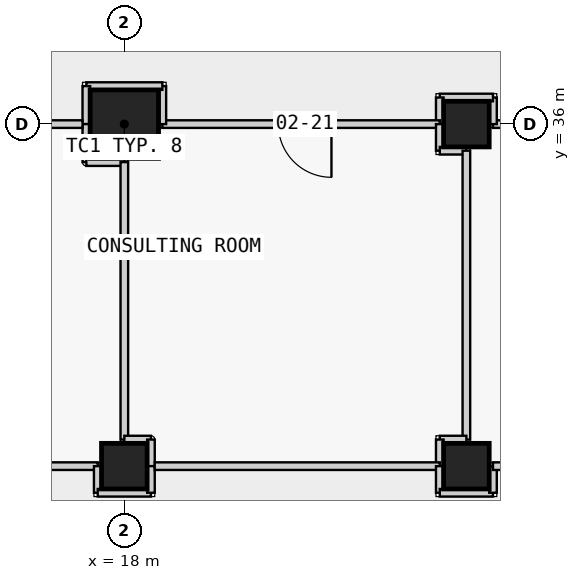
"""IFC4 building model, lengths in metres.
Left out: names, types, materials, properties, quantities, classifications, styles, units other than length and angle.
Written with IfcOpenShell. Run it as: python <this file> out.ifc"""

import sys

from ifc_helpers import new_model, si_unit, direction, frame, frame_2d, origin, origin_2d, place, context, subcontext, project, spatial, rectangle, extrude, element, fill, save


model = new_model("IFC4")
c1 = context("Model", 3, precision=1e-05, world=origin(), true_north=direction((0.0, 1.0)))
c2 = subcontext(c1, "Body", "Model", "MODEL_VIEW")
j1 = project(units=[si_unit("LENGTHUNIT", "METRE"), si_unit("PLANEANGLEUNIT", "RADIAN")], contexts=[c1])
p1 = place(None, origin())
s1 = spatial("IfcSite", under=j1, at=p1, CompositionType="ELEMENT")
p2 = place(p1, origin())
s2 = spatial("IfcBuilding", under=s1, at=p2, CompositionType="ELEMENT")
p3 = place(p2, frame((0.0, 0.0, 12.8)))
s3 = spatial("IfcBuildingStorey", under=s2, at=p3, CompositionType="ELEMENT", Elevation=12.8)
p4 = place(p3, frame((18.0, 27.0, 0.0), z_axis=(0.0, 0.0, 1.0), x_axis=(1.0, 0.0, 0.0)))
e1 = element("IfcColumn", 1, at=p4, inside=s3, PredefinedType="COLUMN", context=c2, shape_type="SweptSolid", body=[
    extrude(rectangle(XDim=1.2, YDim=1.2, at=origin_2d()), origin(), (0.0, 0.0, 1.0), 4.5),
])
p5 = place(p3, frame((18.0, 36.0, 0.0), z_axis=(0.0, 0.0, 1.0), x_axis=(1.0, 0.0, 0.0)))
e2 = element("IfcColumn", 2, at=p5, inside=s3, PredefinedType="COLUMN", context=c2, shape_type="SweptSolid", body=[
    extrude(rectangle(XDim=1.8, YDim=1.8, at=origin_2d()), origin(), (0.0, 0.0, 1.0), 4.5),
])
for number, where, z_axis, x_axis in (
    (3, (27.0, 27.0, 0.0), (0.0, 0.0, 1.0), (1.0, 0.0, 0.0)),
    (4, (27.0, 36.0, 0.0), (0.0, 0.0, 1.0), (1.0, 0.0, 0.0)),
):
    element("IfcColumn", number, at=place(p3, frame(where, z_axis=z_axis, x_axis=x_axis)), inside=s3, PredefinedType="COLUMN", context=c2, shape_type="SweptSolid", body=[
        extrude(rectangle(XDim=1.2, YDim=1.2, at=origin_2d()), origin(), (0.0, 0.0, 1.0), 4.5),
    ])
p6 = place(p3, frame((35.3, 36.0, 0.0), z_axis=(0.0, 0.0, 1.0), x_axis=(-1.0, 0.0, 0.0)))
e5 = element("IfcWall", 5, at=p6, inside=s3, PredefinedType="PARTITIONING", context=c2, shape_type="SweptSolid", body=[
    extrude(rectangle(XDim=7.6, YDim=0.2, at=frame_2d((3.8, 0.0))), origin(), (0.0, 0.0, 1.0), 3.45),
])
p7 = place(p6, frame((3.1, 0.0, 0.0)))
e6 = element("IfcOpeningElement", 6, at=p7, cuts=e5, PredefinedType="OPENING", context=c2, shape_type="SweptSolid", body=[
    extrude(rectangle(XDim=1.4, YDim=2.1, at=frame_2d((0.7, 1.05))), frame((0.0, 0.11, 0.0), z_axis=(0.0, -1.0, 0.0), x_axis=(1.0, 0.0, 0.0)), (0.0, 0.0, 1.0), 0.22),
])
p8 = place(p3, frame((27.7, 36.0, 0.0), z_axis=(0.0, 0.0, 1.0), x_axis=(0.0, 1.0, 0.0)))
e7 = element("IfcWall", 7, at=p8, inside=s3, PredefinedType="PARTITIONING", context=c2, shape_type="SweptSolid", body=[
    extrude(rectangle(XDim=0.7, YDim=0.2, at=frame_2d((0.35, 0.0))), origin(), (0.0, 0.0, 1.0), 3.45),
])
p9 = place(p3, frame((27.7, 36.7, 0.0), z_axis=(0.0, 0.0, 1.0), x_axis=(-1.0, 0.0, 0.0)))
e8 = element("IfcWall", 8, at=p9, inside=s3, PredefinedType="PARTITIONING", context=c2, shape_type="SweptSolid", body=[
    extrude(rectangle(XDim=1.4, YDim=0.2, at=frame_2d((0.7, 0.0))), origin(), (0.0, 0.0, 1.0), 3.45),
])
p10 = place(p3, frame((26.3, 36.7, 0.0), z_axis=(0.0, 0.0, 1.0), x_axis=(0.0, -1.0, 0.0)))
e9 = element("IfcWall", 9, at=p10, inside=s3, PredefinedType="PARTITIONING", context=c2, shape_type="SweptSolid", body=[
    extrude(rectangle(XDim=0.7, YDim=0.2, at=frame_2d((0.35, 0.0))), origin(), (0.0, 0.0, 1.0), 3.45),
])
p11 = place(p3, frame((26.3, 36.0, 0.0), z_axis=(0.0, 0.0, 1.0), x_axis=(-1.0, 0.0, 0.0)))
e10 = element("IfcWall", 10, at=p11, inside=s3, PredefinedType="PARTITIONING", context=c2, shape_type="SweptSolid", body=[
    extrude(rectangle(XDim=7.3, YDim=0.2, at=frame_2d((3.65, 0.0))), origin(), (0.0, 0.0, 1.0), 3.45),
])
p12 = place(p11, frame((2.85, 0.0, 0.0)))
e11 = element("IfcOpeningElement", 11, at=p12, cuts=e10, PredefinedType="OPENING", context=c2, shape_type="SweptSolid", body=[
    extrude(rectangle(XDim=1.4, YDim=2.1, at=frame_2d((0.7, 1.05))), frame((0.0, 0.11, 0.0), z_axis=(0.0, -1.0, 0.0), x_axis=(1.0, 0.0, 0.0)), (0.0, 0.0, 1.0), 0.22),
])
p13 = place(p3, frame((19.0, 36.0, 0.0), z_axis=(0.0, 0.0, 1.0), x_axis=(0.0, 1.0, 0.0)))
e12 = element("IfcWall", 12, at=p13, inside=s3, PredefinedType="PARTITIONING", context=c2, shape_type="SweptSolid", body=[
    extrude(rectangle(XDim=1.0, YDim=0.2, at=frame_2d((0.5, 0.0))), origin(), (0.0, 0.0, 1.0), 3.45),
])
p14 = place(p3, frame((19.0, 37.0, 0.0), z_axis=(0.0, 0.0, 1.0), x_axis=(-1.0, 0.0, 0.0)))
e13 = element("IfcWall", 13, at=p14, inside=s3, PredefinedType="PARTITIONING", context=c2, shape_type="SweptSolid", body=[
    extrude(rectangle(XDim=2.0, YDim=0.2, at=frame_2d((1.0, 0.0))), origin(), (0.0, 0.0, 1.0), 3.45),
])
for number, where, z_axis, x_axis in (
    (14, (17.0, 37.0, 0.0), (0.0, 0.0, 1.0), (0.0, -1.0, 0.0)),
    (15, (17.0, 36.0, 0.0), (0.0, 0.0, 1.0), (0.0, -1.0, 0.0)),
    (16, (17.0, 35.0, 0.0), (0.0, 0.0, 1.0), (1.0, 0.0, 0.0)),
):
    element("IfcWall", number, at=place(p3, frame(where, z_axis=z_axis, x_axis=x_axis)), inside=s3, PredefinedType="PARTITIONING", context=c2, shape_type="SweptSolid", body=[
        extrude(rectangle(XDim=1.0, YDim=0.2, at=frame_2d((0.5, 0.0))), origin(), (0.0, 0.0, 1.0), 3.45),
    ])
p15 = place(p3, frame((18.0, 35.0, 0.0), z_axis=(0.0, 0.0, 1.0), x_axis=(0.0, -1.0, 0.0)))
e17 = element("IfcWall", 17, at=p15, inside=s3, PredefinedType="PARTITIONING", context=c2, shape_type="SweptSolid", body=[
    extrude(rectangle(XDim=7.3, YDim=0.2, at=frame_2d((3.65, 0.0))), origin(), (0.0, 0.0, 1.0), 3.45),
])
for number, where, z_axis, x_axis in (
    (18, (18.0, 27.7, 0.0), (0.0, 0.0, 1.0), (1.0, 0.0, 0.0)),
    (19, (18.7, 27.7, 0.0), (0.0, 0.0, 1.0), (0.0, -1.0, 0.0)),
    (20, (26.3, 36.0, 0.0), (0.0, 0.0, 1.0), (0.0, -1.0, 0.0)),
    (21, (26.3, 35.3, 0.0), (0.0, 0.0, 1.0), (1.0, 0.0, 0.0)),
):
    element("IfcWall", number, at=place(p3, frame(where, z_axis=z_axis, x_axis=x_axis)), inside=s3, PredefinedType="PARTITIONING", context=c2, shape_type="SweptSolid", body=[
        extrude(rectangle(XDim=0.7, YDim=0.2, at=frame_2d((0.35, 0.0))), origin(), (0.0, 0.0, 1.0), 3.45),
    ])
p16 = place(p3, frame((27.0, 35.3, 0.0), z_axis=(0.0, 0.0, 1.0), x_axis=(0.0, -1.0, 0.0)))
e22 = element("IfcWall", 22, at=p16, inside=s3, PredefinedType="PARTITIONING", context=c2, shape_type="SweptSolid", body=[
    extrude(rectangle(XDim=7.6, YDim=0.2, at=frame_2d((3.8, 0.0))), origin(), (0.0, 0.0, 1.0), 3.45),
])
for number, where, z_axis, x_axis in (
    (23, (27.0, 27.7, 0.0), (0.0, 0.0, 1.0), (-1.0, 0.0, 0.0)),
    (24, (26.3, 27.7, 0.0), (0.0, 0.0, 1.0), (0.0, -1.0, 0.0)),
):
    element("IfcWall", number, at=place(p3, frame(where, z_axis=z_axis, x_axis=x_axis)), inside=s3, PredefinedType="PARTITIONING", context=c2, shape_type="SweptSolid", body=[
        extrude(rectangle(XDim=0.7, YDim=0.2, at=frame_2d((0.35, 0.0))), origin(), (0.0, 0.0, 1.0), 3.45),
    ])
p17 = place(p3, frame((9.7, 27.0, 0.0), z_axis=(0.0, 0.0, 1.0), x_axis=(1.0, 0.0, 0.0)))
e25 = element("IfcWall", 25, at=p17, inside=s3, PredefinedType="PARTITIONING", context=c2, shape_type="SweptSolid", body=[
    extrude(rectangle(XDim=7.6, YDim=0.2, at=frame_2d((3.8, 0.0))), origin(), (0.0, 0.0, 1.0), 3.45),
])
p18 = place(p17, frame((3.1, 0.0, 0.0)))
e26 = element("IfcOpeningElement", 26, at=p18, cuts=e25, PredefinedType="OPENING", context=c2, shape_type="SweptSolid", body=[
    extrude(rectangle(XDim=1.4, YDim=2.1, at=frame_2d((0.7, 1.05))), frame((0.0, 0.11, 0.0), z_axis=(0.0, -1.0, 0.0), x_axis=(1.0, 0.0, 0.0)), (0.0, 0.0, 1.0), 0.22),
])
p19 = place(p3, frame((17.3, 27.0, 0.0), z_axis=(0.0, 0.0, 1.0), x_axis=(0.0, -1.0, 0.0)))
e27 = element("IfcWall", 27, at=p19, inside=s3, PredefinedType="PARTITIONING", context=c2, shape_type="SweptSolid", body=[
    extrude(rectangle(XDim=0.7, YDim=0.2, at=frame_2d((0.35, 0.0))), origin(), (0.0, 0.0, 1.0), 3.45),
])
p20 = place(p3, frame((17.3, 26.3, 0.0), z_axis=(0.0, 0.0, 1.0), x_axis=(1.0, 0.0, 0.0)))
e28 = element("IfcWall", 28, at=p20, inside=s3, PredefinedType="PARTITIONING", context=c2, shape_type="SweptSolid", body=[
    extrude(rectangle(XDim=1.4, YDim=0.2, at=frame_2d((0.7, 0.0))), origin(), (0.0, 0.0, 1.0), 4.15),
])
p21 = place(p3, frame((18.7, 26.3, 0.0), z_axis=(0.0, 0.0, 1.0), x_axis=(0.0, 1.0, 0.0)))
e29 = element("IfcWall", 29, at=p21, inside=s3, PredefinedType="PARTITIONING", context=c2, shape_type="SweptSolid", body=[
    extrude(rectangle(XDim=0.7, YDim=0.2, at=frame_2d((0.35, 0.0))), origin(), (0.0, 0.0, 1.0), 3.45),
])
p22 = place(p3, frame((16.9, 36.0, 0.0), z_axis=(0.0, 0.0, 1.0), x_axis=(-1.0, 0.0, 0.0)))
e30 = element("IfcWall", 30, at=p22, inside=s3, PredefinedType="PARTITIONING", context=c2, shape_type="SweptSolid", body=[
    extrude(rectangle(XDim=7.2, YDim=0.2, at=frame_2d((3.6, 0.0))), origin(), (0.0, 0.0, 1.0), 3.45),
])
p23 = place(p3, frame((18.8, 27.0, 0.0), z_axis=(0.0, 0.0, 1.0), x_axis=(1.0, 0.0, 0.0)))
e31 = element("IfcWall", 31, at=p23, inside=s3, PredefinedType="PARTITIONING", context=c2, shape_type="SweptSolid", body=[
    extrude(rectangle(XDim=7.5, YDim=0.2, at=frame_2d((3.75, 0.0))), origin(), (0.0, 0.0, 1.0), 3.45),
])
p24 = place(p3, frame((26.3, 27.0, 0.0), z_axis=(0.0, 0.0, 1.0), x_axis=(0.0, -1.0, 0.0)))
e32 = element("IfcWall", 32, at=p24, inside=s3, PredefinedType="PARTITIONING", context=c2, shape_type="SweptSolid", body=[
    extrude(rectangle(XDim=0.7, YDim=0.2, at=frame_2d((0.35, 0.0))), origin(), (0.0, 0.0, 1.0), 3.45),
])
p25 = place(p3, frame((26.3, 26.3, 0.0), z_axis=(0.0, 0.0, 1.0), x_axis=(1.0, 0.0, 0.0)))
e33 = element("IfcWall", 33, at=p25, inside=s3, PredefinedType="PARTITIONING", context=c2, shape_type="SweptSolid", body=[
    extrude(rectangle(XDim=1.4, YDim=0.2, at=frame_2d((0.7, 0.0))), origin(), (0.0, 0.0, 1.0), 3.45),
])
p26 = place(p3, frame((27.7, 26.3, 0.0), z_axis=(0.0, 0.0, 1.0), x_axis=(0.0, 1.0, 0.0)))
e34 = element("IfcWall", 34, at=p26, inside=s3, PredefinedType="PARTITIONING", context=c2, shape_type="SweptSolid", body=[
    extrude(rectangle(XDim=0.7, YDim=0.2, at=frame_2d((0.35, 0.0))), origin(), (0.0, 0.0, 1.0), 3.45),
])
p27 = place(p3, frame((27.7, 27.0, 0.0), z_axis=(0.0, 0.0, 1.0), x_axis=(1.0, 0.0, 0.0)))
e35 = element("IfcWall", 35, at=p27, inside=s3, PredefinedType="PARTITIONING", context=c2, shape_type="SweptSolid", body=[
    extrude(rectangle(XDim=2.9, YDim=0.2, at=frame_2d((1.45, 0.0))), origin(), (0.0, 0.0, 1.0), 3.45),
])
p28 = place(p12, origin())
e36 = element("IfcDoor", 36, at=p28, inside=s3, OperationType="SINGLE_SWING_LEFT", PredefinedType="DOOR", context=c2, shape_type="SweptSolid", body=[
    extrude(rectangle(XDim=1.4, YDim=2.1, at=frame_2d((0.7, 1.05))), frame((0.0, 0.025, 0.0), z_axis=(0.0, -1.0, 0.0), x_axis=(1.0, 0.0, 0.0)), (0.0, 0.0, 1.0), 0.05),
])
fill(e11, e36)
save(model, sys.argv[1])
